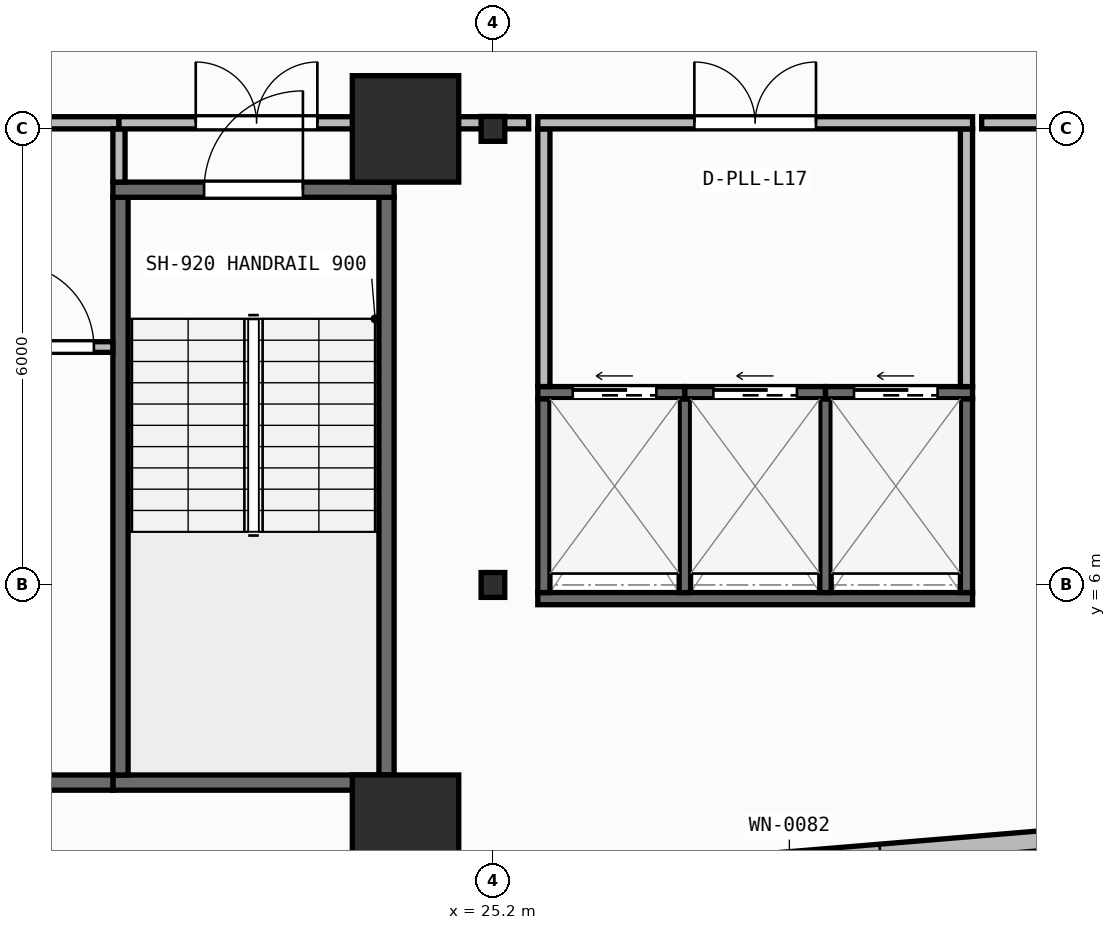
"""IFC4 building model, lengths in metres.
Left out: names, types, materials, properties, quantities, classifications, styles, units other than length and angle.
Written with IfcOpenShell. Run it as: python <this file> out.ifc"""

import sys

from ifc_helpers import new_model, si_unit, direction, frame, frame_2d, origin, origin_2d, place, context, subcontext, project, spatial, rectangle, i_section, extrude, element, fill, save


model = new_model("IFC4")
c1 = context("Model", 3, precision=1e-05, world=origin(), true_north=direction((0.0, 1.0)))
c2 = subcontext(c1, "Body", "Model", "MODEL_VIEW")
j1 = project(units=[si_unit("LENGTHUNIT", "METRE"), si_unit("PLANEANGLEUNIT", "RADIAN")], contexts=[c1])
p1 = place(None, origin())
s1 = spatial("IfcSite", under=j1, at=p1, CompositionType="ELEMENT")
p2 = place(p1, origin())
s2 = spatial("IfcBuilding", under=s1, at=p2, CompositionType="ELEMENT")
p3 = place(p2, frame((0.0, 0.0, 69.9)))
s3 = spatial("IfcBuildingStorey", under=s2, at=p3, CompositionType="ELEMENT", Elevation=69.9)
p4 = place(p3, frame((24.05, 2.8, 0.0), z_axis=(0.0, 0.0, 1.0), x_axis=(1.0, 0.0, 0.0)))
e1 = element("IfcColumn", 1, at=p4, inside=s3, PredefinedType="COLUMN", context=c2, shape_type="SweptSolid", body=[
    extrude(rectangle(XDim=1.4, YDim=1.4, at=origin_2d()), origin(), (0.0, 0.0, 1.0), 3.95),
])
p5 = place(p3, frame((25.2, 6.0, 0.0), z_axis=(0.0, 0.0, 1.0), x_axis=(1.0, 0.0, 0.0)))
e2 = element("IfcColumn", 2, at=p5, inside=s3, PredefinedType="COLUMN", context=c2, shape_type="SweptSolid", body=[
    extrude(i_section(OverallWidth=0.311, OverallDepth=0.327, WebThickness=0.016, FlangeThickness=0.025, FilletRadius=0.017, at=origin_2d()), origin(), (0.0, 0.0, 1.0), 3.95),
])
p6 = place(p3, frame((24.05, 12.0, 0.0), z_axis=(0.0, 0.0, 1.0), x_axis=(1.0, 0.0, 0.0)))
e3 = element("IfcColumn", 3, at=p6, inside=s3, PredefinedType="COLUMN", context=c2, shape_type="SweptSolid", body=[
    extrude(rectangle(XDim=1.4, YDim=1.4, at=origin_2d()), origin(), (0.0, 0.0, 1.0), 3.95),
])
p7 = place(p3, frame((25.2, 12.0, 0.0), z_axis=(0.0, 0.0, 1.0), x_axis=(1.0, 0.0, 0.0)))
e4 = element("IfcColumn", 4, at=p7, inside=s3, PredefinedType="COLUMN", context=c2, shape_type="SweptSolid", body=[
    extrude(i_section(OverallWidth=0.311, OverallDepth=0.327, WebThickness=0.016, FlangeThickness=0.025, FilletRadius=0.017, at=origin_2d()), origin(), (0.0, 0.0, 1.0), 3.95),
])
p8 = place(p3, frame((2.76, 0.174, 0.0), z_axis=(0.0, 0.0, 1.0), x_axis=(0.996571478456, 0.082736257641, 0.0)))
e5 = element("IfcWall", 5, at=p8, inside=s3, PredefinedType="STANDARD", context=c2, shape_type="SweptSolid", body=[
    extrude(rectangle(XDim=52.861, YDim=0.26, at=frame_2d((26.431, 0.0))), origin(), (0.0, 0.0, 1.0), 3.71),
])
p9 = place(p8, frame((25.231, 0.0, 0.9)))
e6 = element("IfcOpeningElement", 6, at=p9, cuts=e5, PredefinedType="OPENING", context=c2, shape_type="SweptSolid", body=[
    extrude(rectangle(XDim=2.4, YDim=1.65, at=frame_2d((1.2, 0.825))), frame((0.0, 0.14, 0.0), z_axis=(0.0, -1.0, 0.0), x_axis=(1.0, 0.0, 0.0)), (0.0, 0.0, 1.0), 0.28),
])
p10 = place(p3, frame((20.2, 3.4, 0.0), z_axis=(0.0, 0.0, 1.0), x_axis=(1.0, 0.0, 0.0)))
e7 = element("IfcWall", 7, at=p10, inside=s3, PredefinedType="SHEAR", context=c2, shape_type="SweptSolid", body=[
    extrude(rectangle(XDim=3.7, YDim=0.2, at=frame_2d((1.85, 0.0))), origin(), (0.0, 0.0, 1.0), 3.71),
])
for number, where, z_axis, x_axis in (
    (8, (20.3, 3.5, 0.0), (0.0, 0.0, 1.0), (0.0, 1.0, 0.0)),
    (9, (23.8, 3.5, 0.0), (0.0, 0.0, 1.0), (0.0, 1.0, 0.0)),
):
    element("IfcWall", number, at=place(p3, frame(where, z_axis=z_axis, x_axis=x_axis)), inside=s3, PredefinedType="SHEAR", context=c2, shape_type="SweptSolid", body=[
        extrude(rectangle(XDim=7.6, YDim=0.2, at=frame_2d((3.8, 0.0))), origin(), (0.0, 0.0, 1.0), 3.71),
    ])
p11 = place(p3, frame((20.2, 11.2, 0.0), z_axis=(0.0, 0.0, 1.0), x_axis=(1.0, 0.0, 0.0)))
e10 = element("IfcWall", 10, at=p11, inside=s3, PredefinedType="SHEAR", context=c2, shape_type="SweptSolid", body=[
    extrude(rectangle(XDim=3.7, YDim=0.2, at=frame_2d((1.85, 0.0))), origin(), (0.0, 0.0, 1.0), 3.71),
])
p12 = place(p11, frame((1.2, 0.0, 0.0)))
e11 = element("IfcOpeningElement", 11, at=p12, cuts=e10, PredefinedType="OPENING", context=c2, shape_type="SweptSolid", body=[
    extrude(rectangle(XDim=1.3, YDim=2.15, at=frame_2d((0.65, 1.075))), frame((0.0, 0.11, 0.0), z_axis=(0.0, -1.0, 0.0), x_axis=(1.0, 0.0, 0.0)), (0.0, 0.0, 1.0), 0.22),
])
p13 = place(p3, frame((6.5, 3.4, 0.0), z_axis=(0.0, 0.0, 1.0), x_axis=(1.0, 0.0, 0.0)))
e12 = element("IfcWall", 12, at=p13, inside=s3, PredefinedType="SHEAR", context=c2, shape_type="SweptSolid", body=[
    extrude(rectangle(XDim=13.7, YDim=0.2, at=frame_2d((6.85, 0.0))), origin(), (0.0, 0.0, 1.0), 3.71),
])
p14 = place(p3, frame((25.79, 5.82, 0.0), z_axis=(0.0, 0.0, 1.0), x_axis=(1.0, 0.0, 0.0)))
e13 = element("IfcWall", 13, at=p14, inside=s3, PredefinedType="SHEAR", context=c2, shape_type="SweptSolid", body=[
    extrude(rectangle(XDim=5.72, YDim=0.16, at=frame_2d((2.86, 0.0))), origin(), (0.0, 0.0, 1.0), 3.71),
])
for number, where, z_axis, x_axis in (
    (14, (25.87, 5.9, 0.0), (0.0, 0.0, 1.0), (0.0, 1.0, 0.0)),
    (15, (31.43, 5.9, 0.0), (0.0, 0.0, 1.0), (0.0, 1.0, 0.0)),
):
    element("IfcWall", number, at=place(p3, frame(where, z_axis=z_axis, x_axis=x_axis)), inside=s3, PredefinedType="SHEAR", context=c2, shape_type="SweptSolid", body=[
        extrude(rectangle(XDim=2.55, YDim=0.16, at=frame_2d((1.275, 0.0))), origin(), (0.0, 0.0, 1.0), 3.71),
    ])
for number, where, z_axis, x_axis in (
    (16, (27.725, 5.9, 0.0), (0.0, 0.0, 1.0), (0.0, 1.0, 0.0)),
    (17, (29.575, 5.9, 0.0), (0.0, 0.0, 1.0), (0.0, 1.0, 0.0)),
):
    element("IfcWall", number, at=place(p3, frame(where, z_axis=z_axis, x_axis=x_axis)), inside=s3, PredefinedType="SHEAR", context=c2, shape_type="SweptSolid", body=[
        extrude(rectangle(XDim=2.55, YDim=0.15, at=frame_2d((1.275, 0.0))), origin(), (0.0, 0.0, 1.0), 3.71),
    ])
p15 = place(p3, frame((25.79, 8.53, 0.0), z_axis=(0.0, 0.0, 1.0), x_axis=(1.0, 0.0, 0.0)))
e18 = element("IfcWall", 18, at=p15, inside=s3, PredefinedType="SHEAR", context=c2, shape_type="SweptSolid", body=[
    extrude(rectangle(XDim=1.935, YDim=0.16, at=frame_2d((0.968, 0.0))), origin(), (0.0, 0.0, 1.0), 3.71),
])
p16 = place(p15, frame((0.46, 0.0, 0.0)))
e19 = element("IfcOpeningElement", 19, at=p16, cuts=e18, PredefinedType="OPENING", context=c2, shape_type="SweptSolid", body=[
    extrude(rectangle(XDim=1.1, YDim=2.15, at=frame_2d((0.55, 1.075))), frame((0.0, 0.09, 0.0), z_axis=(0.0, -1.0, 0.0), x_axis=(1.0, 0.0, 0.0)), (0.0, 0.0, 1.0), 0.18),
])
p17 = place(p3, frame((27.725, 8.53, 0.0), z_axis=(0.0, 0.0, 1.0), x_axis=(1.0, 0.0, 0.0)))
e20 = element("IfcWall", 20, at=p17, inside=s3, PredefinedType="SHEAR", context=c2, shape_type="SweptSolid", body=[
    extrude(rectangle(XDim=1.85, YDim=0.16, at=frame_2d((0.925, 0.0))), origin(), (0.0, 0.0, 1.0), 3.71),
])
p18 = place(p17, frame((0.375, 0.0, 0.0)))
e21 = element("IfcOpeningElement", 21, at=p18, cuts=e20, PredefinedType="OPENING", context=c2, shape_type="SweptSolid", body=[
    extrude(rectangle(XDim=1.1, YDim=2.15, at=frame_2d((0.55, 1.075))), frame((0.0, 0.09, 0.0), z_axis=(0.0, -1.0, 0.0), x_axis=(1.0, 0.0, 0.0)), (0.0, 0.0, 1.0), 0.18),
])
p19 = place(p3, frame((29.575, 8.53, 0.0), z_axis=(0.0, 0.0, 1.0), x_axis=(1.0, 0.0, 0.0)))
e22 = element("IfcWall", 22, at=p19, inside=s3, PredefinedType="SHEAR", context=c2, shape_type="SweptSolid", body=[
    extrude(rectangle(XDim=1.935, YDim=0.16, at=frame_2d((0.968, 0.0))), origin(), (0.0, 0.0, 1.0), 3.71),
])
p20 = place(p19, frame((0.375, 0.0, 0.0)))
e23 = element("IfcOpeningElement", 23, at=p20, cuts=e22, PredefinedType="OPENING", context=c2, shape_type="SweptSolid", body=[
    extrude(rectangle(XDim=1.1, YDim=2.15, at=frame_2d((0.55, 1.075))), frame((0.0, 0.09, 0.0), z_axis=(0.0, -1.0, 0.0), x_axis=(1.0, 0.0, 0.0)), (0.0, 0.0, 1.0), 0.18),
])
p21 = place(p3, frame((18.61, 9.13, 0.0), z_axis=(0.0, 0.0, 1.0), x_axis=(1.0, 0.0, 0.0)))
e24 = element("IfcWall", 24, at=p21, inside=s3, PredefinedType="PARTITIONING", context=c2, shape_type="SweptSolid", body=[
    extrude(rectangle(XDim=1.59, YDim=0.14, at=frame_2d((0.795, 0.0))), origin(), (0.0, 0.0, 1.0), 3.71),
])
p22 = place(p21, frame((0.24, 0.0, 0.0)))
e25 = element("IfcOpeningElement", 25, at=p22, cuts=e24, PredefinedType="OPENING", context=c2, shape_type="SweptSolid", body=[
    extrude(rectangle(XDim=1.1, YDim=2.1, at=frame_2d((0.55, 1.05))), frame((0.0, 0.08, 0.0), z_axis=(0.0, -1.0, 0.0), x_axis=(1.0, 0.0, 0.0)), (0.0, 0.0, 1.0), 0.16),
])
p23 = place(p3, frame((12.58, 12.08, 0.0), z_axis=(0.0, 0.0, 1.0), x_axis=(1.0, 0.0, 0.0)))
e26 = element("IfcWall", 26, at=p23, inside=s3, PredefinedType="PARTITIONING", context=c2, shape_type="SweptSolid", body=[
    extrude(rectangle(XDim=7.7, YDim=0.16, at=frame_2d((3.85, 0.0))), origin(), (0.0, 0.0, 1.0), 3.073),
])
p24 = place(p23, frame((3.05, 0.0, 0.0)))
e27 = element("IfcOpeningElement", 27, at=p24, cuts=e26, PredefinedType="OPENING", context=c2, shape_type="SweptSolid", body=[
    extrude(rectangle(XDim=1.6, YDim=2.05, at=frame_2d((0.8, 1.025))), frame((0.0, 0.09, 0.0), z_axis=(0.0, -1.0, 0.0), x_axis=(1.0, 0.0, 0.0)), (0.0, 0.0, 1.0), 0.18),
])
p25 = place(p3, frame((20.28, 11.3, 0.0), z_axis=(0.0, 0.0, 1.0), x_axis=(0.0, 1.0, 0.0)))
e28 = element("IfcWall", 28, at=p25, inside=s3, PredefinedType="PARTITIONING", context=c2, shape_type="SweptSolid", body=[
    extrude(rectangle(XDim=0.7, YDim=0.16, at=frame_2d((0.35, 0.0))), origin(), (0.0, 0.0, 1.0), 3.71),
])
p26 = place(p3, frame((20.28, 12.08, 0.0), z_axis=(0.0, 0.0, 1.0), x_axis=(1.0, 0.0, 0.0)))
e29 = element("IfcWall", 29, at=p26, inside=s3, PredefinedType="PARTITIONING", context=c2, shape_type="SweptSolid", body=[
    extrude(rectangle(XDim=3.62, YDim=0.16, at=frame_2d((1.81, 0.0))), origin(), (0.0, 0.0, 1.0), 3.073),
])
p27 = place(p26, frame((1.01, 0.0, 0.0)))
e30 = element("IfcOpeningElement", 30, at=p27, cuts=e29, PredefinedType="OPENING", context=c2, shape_type="SweptSolid", body=[
    extrude(rectangle(XDim=1.6, YDim=2.05, at=frame_2d((0.8, 1.025))), frame((0.0, 0.09, 0.0), z_axis=(0.0, -1.0, 0.0), x_axis=(1.0, 0.0, 0.0)), (0.0, 0.0, 1.0), 0.18),
])
p28 = place(p3, frame((23.82, 11.3, 0.0), z_axis=(0.0, 0.0, 1.0), x_axis=(0.0, 1.0, 0.0)))
e31 = element("IfcWall", 31, at=p28, inside=s3, PredefinedType="PARTITIONING", context=c2, shape_type="SweptSolid", body=[
    extrude(rectangle(XDim=0.7, YDim=0.16, at=frame_2d((0.35, 0.0))), origin(), (0.0, 0.0, 1.0), 3.71),
])
for number, where, z_axis, x_axis in (
    (32, (25.87, 8.61, 0.0), (0.0, 0.0, 1.0), (0.0, 1.0, 0.0)),
    (33, (31.43, 8.61, 0.0), (0.0, 0.0, 1.0), (0.0, 1.0, 0.0)),
):
    element("IfcWall", number, at=place(p3, frame(where, z_axis=z_axis, x_axis=x_axis)), inside=s3, PredefinedType="PARTITIONING", context=c2, shape_type="SweptSolid", body=[
        extrude(rectangle(XDim=3.39, YDim=0.16, at=frame_2d((1.695, 0.0))), origin(), (0.0, 0.0, 1.0), 3.71),
    ])
p29 = place(p3, frame((25.79, 12.08, 0.0), z_axis=(0.0, 0.0, 1.0), x_axis=(1.0, 0.0, 0.0)))
e34 = element("IfcWall", 34, at=p29, inside=s3, PredefinedType="PARTITIONING", context=c2, shape_type="SweptSolid", body=[
    extrude(rectangle(XDim=5.72, YDim=0.16, at=frame_2d((2.86, 0.0))), origin(), (0.0, 0.0, 1.0), 3.073),
])
p30 = place(p29, frame((2.06, 0.0, 0.0)))
e35 = element("IfcOpeningElement", 35, at=p30, cuts=e34, PredefinedType="OPENING", context=c2, shape_type="SweptSolid", body=[
    extrude(rectangle(XDim=1.6, YDim=2.05, at=frame_2d((0.8, 1.025))), frame((0.0, 0.09, 0.0), z_axis=(0.0, -1.0, 0.0), x_axis=(1.0, 0.0, 0.0)), (0.0, 0.0, 1.0), 0.18),
])
p31 = place(p3, frame((24.02, 12.08, 0.0), z_axis=(0.0, 0.0, 1.0), x_axis=(1.0, 0.0, 0.0)))
e36 = element("IfcWall", 36, at=p31, inside=s3, PredefinedType="PARTITIONING", context=c2, shape_type="SweptSolid", body=[
    extrude(rectangle(XDim=1.65, YDim=0.16, at=frame_2d((0.825, 0.0))), origin(), (0.0, 0.0, 1.0), 3.073),
])
p32 = place(p3, frame((31.63, 12.08, 0.0), z_axis=(0.0, 0.0, 1.0), x_axis=(1.0, 0.0, 0.0)))
e37 = element("IfcWall", 37, at=p32, inside=s3, PredefinedType="PARTITIONING", context=c2, shape_type="SweptSolid", body=[
    extrude(rectangle(XDim=11.181, YDim=0.16, at=frame_2d((5.59, 0.0))), origin(), (0.0, 0.0, 1.0), 3.073),
])
p33 = place(p12, origin())
e38 = element("IfcDoor", 38, at=p33, inside=s3, OperationType="SINGLE_SWING_RIGHT", PredefinedType="DOOR", context=c2, shape_type="SweptSolid", body=[
    extrude(rectangle(XDim=1.3, YDim=2.15, at=frame_2d((0.65, 1.075))), frame((0.0, 0.025, 0.0), z_axis=(0.0, -1.0, 0.0), x_axis=(1.0, 0.0, 0.0)), (0.0, 0.0, 1.0), 0.05),
])
fill(e11, e38)
p34 = place(p16, origin())
e39 = element("IfcDoor", 39, at=p34, inside=s3, OperationType="SLIDING_TO_LEFT", PredefinedType="DOOR", context=c2, shape_type="SweptSolid", body=[
    extrude(rectangle(XDim=1.1, YDim=2.15, at=frame_2d((0.55, 1.075))), frame((0.0, 0.025, 0.0), z_axis=(0.0, -1.0, 0.0), x_axis=(1.0, 0.0, 0.0)), (0.0, 0.0, 1.0), 0.05),
])
fill(e19, e39)
p35 = place(p18, origin())
e40 = element("IfcDoor", 40, at=p35, inside=s3, OperationType="SLIDING_TO_LEFT", PredefinedType="DOOR", context=c2, shape_type="SweptSolid", body=[
    extrude(rectangle(XDim=1.1, YDim=2.15, at=frame_2d((0.55, 1.075))), frame((0.0, 0.025, 0.0), z_axis=(0.0, -1.0, 0.0), x_axis=(1.0, 0.0, 0.0)), (0.0, 0.0, 1.0), 0.05),
])
fill(e21, e40)
p36 = place(p20, origin())
e41 = element("IfcDoor", 41, at=p36, inside=s3, OperationType="SLIDING_TO_LEFT", PredefinedType="DOOR", context=c2, shape_type="SweptSolid", body=[
    extrude(rectangle(XDim=1.1, YDim=2.15, at=frame_2d((0.55, 1.075))), frame((0.0, 0.025, 0.0), z_axis=(0.0, -1.0, 0.0), x_axis=(1.0, 0.0, 0.0)), (0.0, 0.0, 1.0), 0.05),
])
fill(e23, e41)
p37 = place(p22, origin())
e42 = element("IfcDoor", 42, at=p37, inside=s3, OperationType="SINGLE_SWING_LEFT", PredefinedType="DOOR", context=c2, shape_type="SweptSolid", body=[
    extrude(rectangle(XDim=1.1, YDim=2.1, at=frame_2d((0.55, 1.05))), frame((0.0, 0.025, 0.0), z_axis=(0.0, -1.0, 0.0), x_axis=(1.0, 0.0, 0.0)), (0.0, 0.0, 1.0), 0.05),
])
fill(e25, e42)
p38 = place(p27, origin())
e43 = element("IfcDoor", 43, at=p38, inside=s3, OperationType="DOUBLE_DOOR_SINGLE_SWING", PredefinedType="DOOR", context=c2, shape_type="SweptSolid", body=[
    extrude(rectangle(XDim=1.6, YDim=2.05, at=frame_2d((0.8, 1.025))), frame((0.0, 0.025, 0.0), z_axis=(0.0, -1.0, 0.0), x_axis=(1.0, 0.0, 0.0)), (0.0, 0.0, 1.0), 0.05),
])
fill(e30, e43)
p39 = place(p30, origin())
e44 = element("IfcDoor", 44, at=p39, inside=s3, OperationType="DOUBLE_DOOR_SINGLE_SWING", PredefinedType="DOOR", context=c2, shape_type="SweptSolid", body=[
    extrude(rectangle(XDim=1.6, YDim=2.05, at=frame_2d((0.8, 1.025))), frame((0.0, 0.025, 0.0), z_axis=(0.0, -1.0, 0.0), x_axis=(1.0, 0.0, 0.0)), (0.0, 0.0, 1.0), 0.05),
])
fill(e35, e44)
save(model, sys.argv[1])
